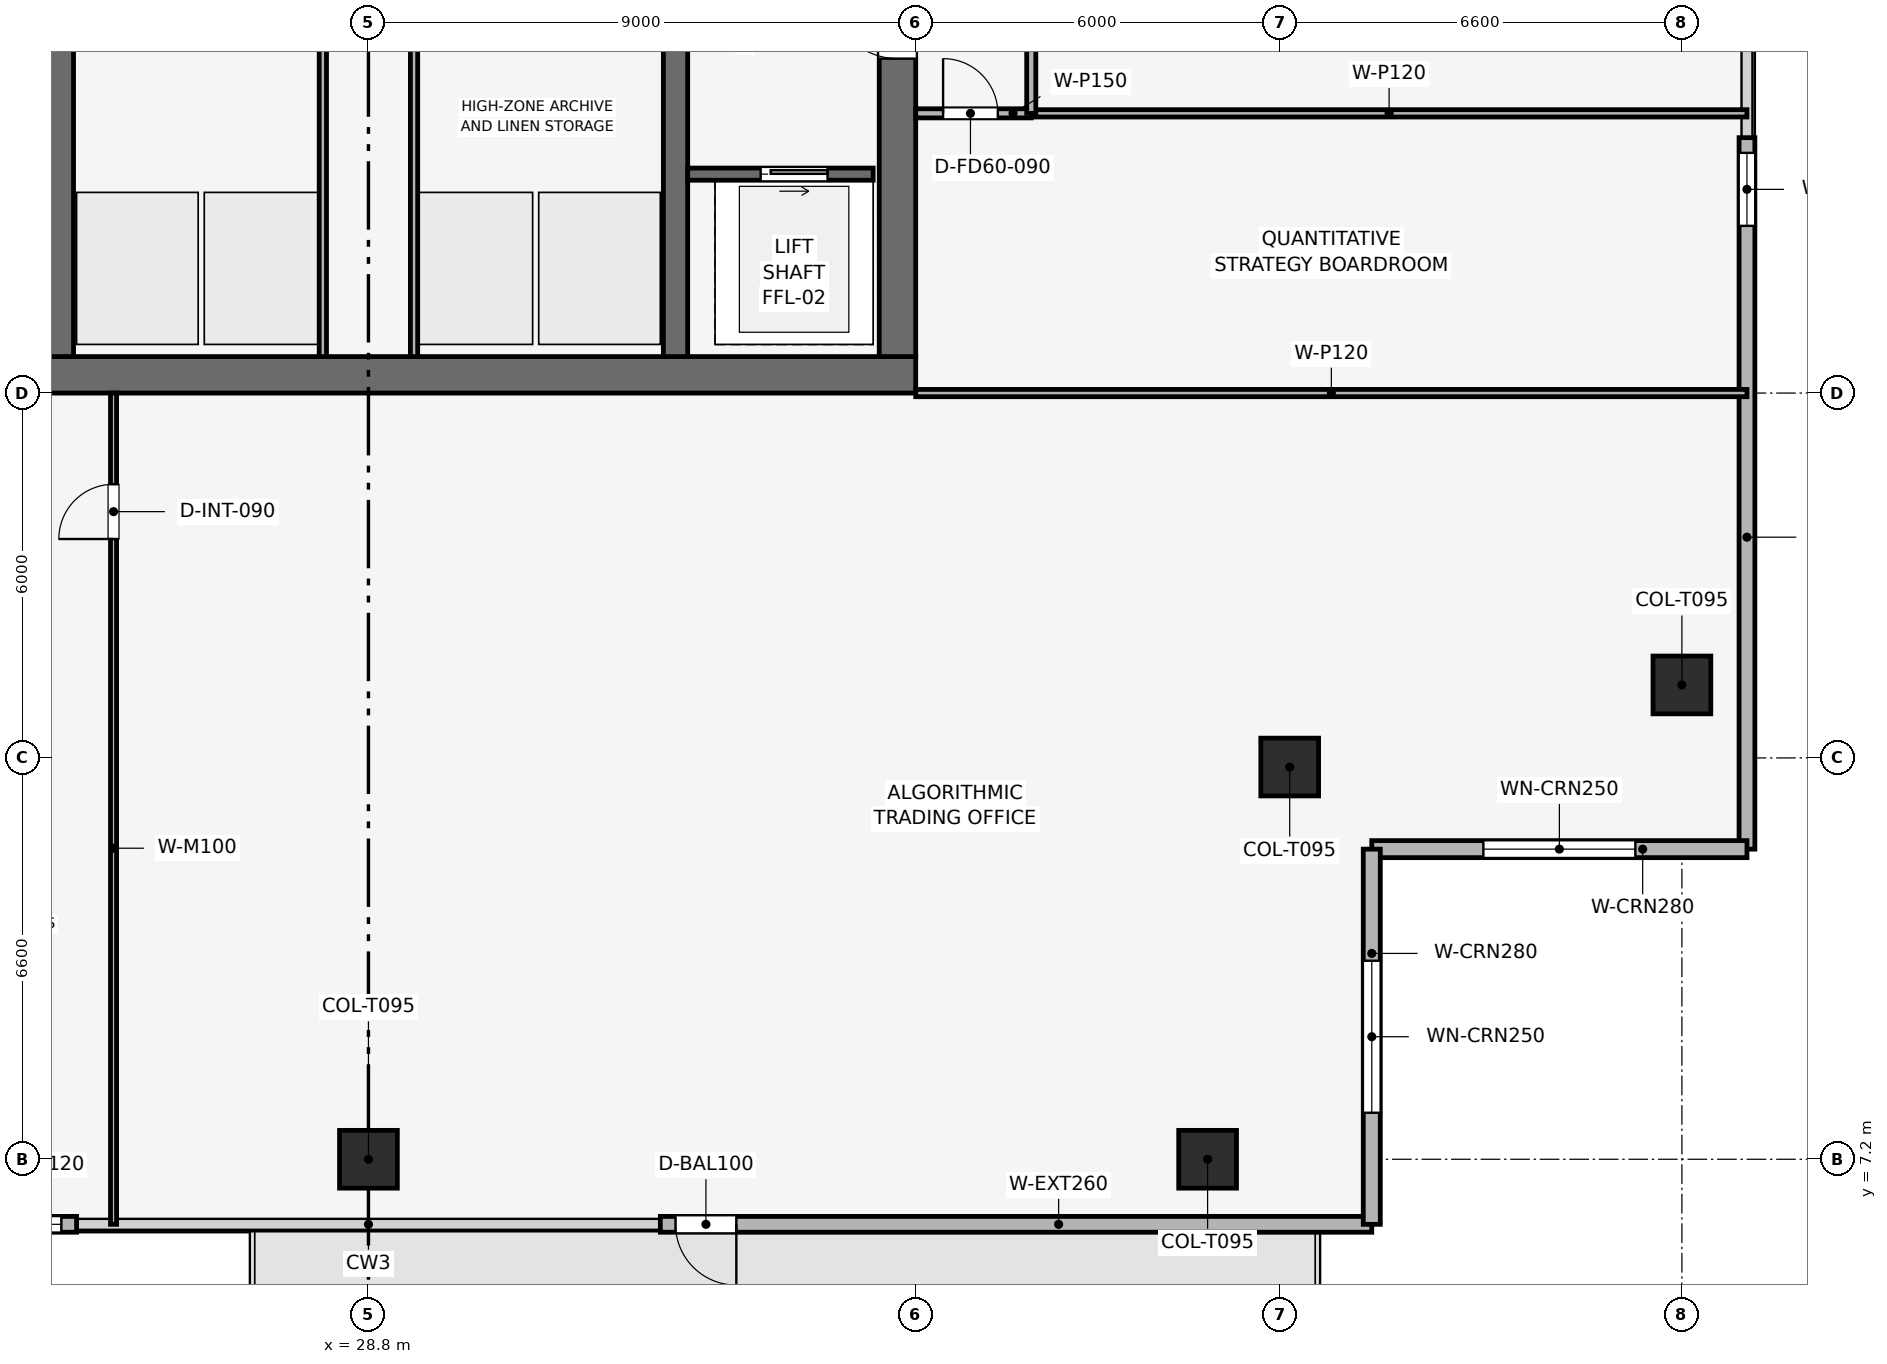
"""IFC4 building model, lengths in metres.
Left out: names, types, materials, properties, quantities, classifications, styles, units other than length and angle.
Written with IfcOpenShell. Run it as: python <this file> out.ifc"""

import sys

from ifc_helpers import new_model, si_unit, direction, frame, frame_2d, origin, origin_2d, place, context, subcontext, project, spatial, rectangle, extrude, element, fill, save


model = new_model("IFC4")
c1 = context("Model", 3, precision=1e-05, world=origin(), true_north=direction((0.0, 1.0)))
c2 = subcontext(c1, "Body", "Model", "MODEL_VIEW")
j1 = project(units=[si_unit("LENGTHUNIT", "METRE"), si_unit("PLANEANGLEUNIT", "RADIAN")], contexts=[c1])
p1 = place(None, origin())
s1 = spatial("IfcSite", under=j1, at=p1, CompositionType="ELEMENT")
p2 = place(p1, origin())
s2 = spatial("IfcBuilding", under=s1, at=p2, CompositionType="ELEMENT")
p3 = place(p2, frame((0.0, 0.0, 329.25)))
s3 = spatial("IfcBuildingStorey", under=s2, at=p3, CompositionType="ELEMENT", Elevation=329.25)
p4 = place(p3, frame((19.8, 20.1, 0.0), z_axis=(0.0, 0.0, 1.0), x_axis=(1.0, 0.0, 0.0)))
e1 = element("IfcWall", 1, at=p4, inside=s3, PredefinedType="SHEAR", context=c2, shape_type="SweptSolid", body=[
    extrude(rectangle(XDim=18.0, YDim=0.6, at=frame_2d((9.0, 0.0))), origin(), (0.0, 0.0, 1.0), 3.75),
])
p5 = place(p3, frame((37.5, 20.4, 0.0), z_axis=(0.0, 0.0, 1.0), x_axis=(0.0, 1.0, 0.0)))
e2 = element("IfcWall", 2, at=p5, inside=s3, PredefinedType="SHEAR", context=c2, shape_type="SweptSolid", body=[
    extrude(rectangle(XDim=16.8, YDim=0.6, at=frame_2d((8.4, 0.0))), origin(), (0.0, 0.0, 1.0), 3.75),
])
p6 = place(p5, frame((4.9, 0.0, 0.0)))
e3 = element("IfcOpeningElement", 3, at=p6, cuts=e2, PredefinedType="OPENING", context=c2, shape_type="SweptSolid", body=[
    extrude(rectangle(XDim=1.1, YDim=2.15, at=frame_2d((0.55, 1.075))), frame((0.0, 0.31, 0.0), z_axis=(0.0, -1.0, 0.0), x_axis=(1.0, 0.0, 0.0)), (0.0, 0.0, 1.0), 0.62),
])
for number, where, z_axis, x_axis in (
    (4, (23.75, 20.4, 0.0), (0.0, 0.0, 1.0), (0.0, 1.0, 0.0)),
    (5, (33.85, 20.4, 0.0), (0.0, 0.0, 1.0), (0.0, 1.0, 0.0)),
):
    element("IfcWall", number, at=place(p3, frame(where, z_axis=z_axis, x_axis=x_axis)), inside=s3, PredefinedType="SHEAR", context=c2, shape_type="SweptSolid", body=[
        extrude(rectangle(XDim=16.8, YDim=0.4, at=frame_2d((8.4, 0.0))), origin(), (0.0, 0.0, 1.0), 3.75),
    ])
for number, where, z_axis, x_axis in (
    (6, (28.8, 7.2, 0.003), (0.0, 0.158, 0.987), (-1.0, 0.0, 0.0)),
    (7, (42.6, 7.2, 0.003), (0.0, 0.158, 0.987), (-1.0, 0.0, 0.0)),
    (8, (50.4, 15.0, 0.003), (-0.158, 0.0, 0.987), (0.0, -1.0, 0.0)),
):
    element("IfcColumn", number, at=place(p3, frame(where, z_axis=z_axis, x_axis=x_axis)), inside=s3, PredefinedType="COLUMN", context=c2, shape_type="SweptSolid", body=[
        extrude(rectangle(XDim=0.95, YDim=0.95, at=origin_2d()), origin(), (0.0, 0.0, 1.0), 3.549),
    ])
p7 = place(p3, frame((43.95, 13.65, 0.003), z_axis=(-0.079681515195, 0.079681515195, 0.993630571325), x_axis=(-0.707106781187, -0.707106781187, 0.0)))
e9 = element("IfcColumn", 9, at=p7, inside=s3, PredefinedType="COLUMN", context=c2, shape_type="SweptSolid", body=[
    extrude(rectangle(XDim=0.95, YDim=0.95, at=origin_2d()), origin(), (0.0, 0.0, 1.0), 3.527),
])
p8 = place(p3, frame((45.3, 6.13, 0.0), z_axis=(0.0, 0.0, 1.0), x_axis=(-1.0, 0.0, 0.0)))
e10 = element("IfcWall", 10, at=p8, inside=s3, PredefinedType="SOLIDWALL", context=c2, shape_type="SweptSolid", body=[
    extrude(rectangle(XDim=11.7, YDim=0.26, at=frame_2d((5.85, 0.0))), origin(), (0.0, 0.0, 1.0), 3.51),
])
p9 = place(p8, frame((10.45, 0.0, 0.0)))
e11 = element("IfcOpeningElement", 11, at=p9, cuts=e10, PredefinedType="OPENING", context=c2, shape_type="SweptSolid", body=[
    extrude(rectangle(XDim=1.0, YDim=2.2, at=frame_2d((0.5, 1.1))), frame((0.0, 0.14, 0.0), z_axis=(0.0, -1.0, 0.0), x_axis=(1.0, 0.0, 0.0)), (0.0, 0.0, 1.0), 0.28),
])
p10 = place(p3, frame((24.0, 6.13, 0.0), z_axis=(0.0, 0.0, 1.0), x_axis=(-1.0, 0.0, 0.0)))
e12 = element("IfcWall", 12, at=p10, inside=s3, PredefinedType="SOLIDWALL", context=c2, shape_type="SweptSolid", body=[
    extrude(rectangle(XDim=11.7, YDim=0.26, at=frame_2d((5.85, 0.0))), origin(), (0.0, 0.0, 1.0), 3.51),
])
p11 = place(p10, frame((0.25, 0.0, 0.9)))
e13 = element("IfcOpeningElement", 13, at=p11, cuts=e12, PredefinedType="OPENING", context=c2, shape_type="SweptSolid", body=[
    extrude(rectangle(XDim=1.2, YDim=2.1, at=frame_2d((0.6, 1.05))), frame((0.0, 0.14, 0.0), z_axis=(0.0, -1.0, 0.0), x_axis=(1.0, 0.0, 0.0)), (0.0, 0.0, 1.0), 0.28),
])
p12 = place(p3, frame((51.47, 24.0, 0.0), z_axis=(0.0, 0.0, 1.0), x_axis=(0.0, -1.0, 0.0)))
e14 = element("IfcWall", 14, at=p12, inside=s3, PredefinedType="SOLIDWALL", context=c2, shape_type="SweptSolid", body=[
    extrude(rectangle(XDim=11.7, YDim=0.26, at=frame_2d((5.85, 0.0))), origin(), (0.0, 0.0, 1.0), 3.51),
])
p13 = place(p12, frame((0.25, 0.0, 0.9)))
e15 = element("IfcOpeningElement", 15, at=p13, cuts=e14, PredefinedType="OPENING", context=c2, shape_type="SweptSolid", body=[
    extrude(rectangle(XDim=1.2, YDim=2.1, at=frame_2d((0.6, 1.05))), frame((0.0, 0.14, 0.0), z_axis=(0.0, -1.0, 0.0), x_axis=(1.0, 0.0, 0.0)), (0.0, 0.0, 1.0), 0.28),
])
p14 = place(p3, frame((51.47, 12.3, 0.0), z_axis=(0.0, 0.0, 1.0), x_axis=(-1.0, 0.0, 0.0)))
e16 = element("IfcWall", 16, at=p14, inside=s3, PredefinedType="SOLIDWALL", context=c2, shape_type="SweptSolid", body=[
    extrude(rectangle(XDim=6.17, YDim=0.28, at=frame_2d((3.085, 0.0))), origin(), (0.0, 0.0, 1.0), 3.51),
])
p15 = place(p14, frame((1.835, 0.0, 0.9)))
e17 = element("IfcOpeningElement", 17, at=p15, cuts=e16, PredefinedType="OPENING", context=c2, shape_type="SweptSolid", body=[
    extrude(rectangle(XDim=2.5, YDim=1.9, at=frame_2d((1.25, 0.95))), frame((0.0, 0.15, 0.0), z_axis=(0.0, -1.0, 0.0), x_axis=(1.0, 0.0, 0.0)), (0.0, 0.0, 1.0), 0.3),
])
p16 = place(p3, frame((45.3, 12.3, 0.0), z_axis=(0.0, 0.0, 1.0), x_axis=(0.0, -1.0, 0.0)))
e18 = element("IfcWall", 18, at=p16, inside=s3, PredefinedType="SOLIDWALL", context=c2, shape_type="SweptSolid", body=[
    extrude(rectangle(XDim=6.17, YDim=0.28, at=frame_2d((3.085, 0.0))), origin(), (0.0, 0.0, 1.0), 3.51),
])
p17 = place(p16, frame((1.835, 0.0, 0.9)))
e19 = element("IfcOpeningElement", 19, at=p17, cuts=e18, PredefinedType="OPENING", context=c2, shape_type="SweptSolid", body=[
    extrude(rectangle(XDim=2.5, YDim=1.9, at=frame_2d((1.25, 0.95))), frame((0.0, 0.15, 0.0), z_axis=(0.0, -1.0, 0.0), x_axis=(1.0, 0.0, 0.0)), (0.0, 0.0, 1.0), 0.3),
])
p18 = place(p3, frame((34.05, 23.4, 0.0), z_axis=(0.0, 0.0, 1.0), x_axis=(1.0, 0.0, 0.0)))
e20 = element("IfcWall", 20, at=p18, inside=s3, PredefinedType="SHEAR", context=c2, shape_type="SweptSolid", body=[
    extrude(rectangle(XDim=3.05, YDim=0.2, at=frame_2d((1.525, 0.0))), origin(), (0.0, 0.0, 1.0), 3.51),
])
p19 = place(p18, frame((1.2, 0.0, 0.0)))
e21 = element("IfcOpeningElement", 21, at=p19, cuts=e20, PredefinedType="OPENING", context=c2, shape_type="SweptSolid", body=[
    extrude(rectangle(XDim=1.1, YDim=2.15, at=frame_2d((0.55, 1.075))), frame((0.0, 0.11, 0.0), z_axis=(0.0, -1.0, 0.0), x_axis=(1.0, 0.0, 0.0)), (0.0, 0.0, 1.0), 0.22),
])
for number, where, z_axis, x_axis in (
    (22, (28.05, 20.4, 0.0), (0.0, 0.0, 1.0), (0.0, 1.0, 0.0)),
    (23, (29.55, 20.4, 0.0), (0.0, 0.0, 1.0), (0.0, 1.0, 0.0)),
):
    element("IfcWall", number, at=place(p3, frame(where, z_axis=z_axis, x_axis=x_axis)), inside=s3, PredefinedType="PARTITIONING", context=c2, shape_type="SweptSolid", body=[
        extrude(rectangle(XDim=8.15, YDim=0.12, at=frame_2d((4.075, 0.0))), origin(), (0.0, 0.0, 1.0), 3.51),
    ])
p20 = place(p3, frame((24.608, 6.13, 0.0), z_axis=(0.0, 0.0, 1.0), x_axis=(0.0, 1.0, 0.0)))
e24 = element("IfcWall", 24, at=p20, inside=s3, PredefinedType="MOVABLE", context=c2, shape_type="SweptSolid", body=[
    extrude(rectangle(XDim=13.67, YDim=0.1, at=frame_2d((6.835, 0.0))), origin(), (0.0, 0.0, 1.0), 3.135),
])
p21 = place(p20, frame((11.27, 0.0, 0.0)))
e25 = element("IfcOpeningElement", 25, at=p21, cuts=e24, PredefinedType="OPENING", context=c2, shape_type="SweptSolid", body=[
    extrude(rectangle(XDim=0.9, YDim=2.1, at=frame_2d((0.45, 1.05))), frame((0.0, 0.06, 0.0), z_axis=(0.0, -1.0, 0.0), x_axis=(1.0, 0.0, 0.0)), (0.0, 0.0, 1.0), 0.12),
])
p22 = place(p3, frame((37.8, 19.8, 0.0), z_axis=(0.0, 0.0, 1.0), x_axis=(1.0, 0.0, 0.0)))
e26 = element("IfcWall", 26, at=p22, inside=s3, PredefinedType="PARTITIONING", context=c2, shape_type="SweptSolid", body=[
    extrude(rectangle(XDim=13.67, YDim=0.12, at=frame_2d((6.835, 0.0))), origin(), (0.0, 0.0, 1.0), 3.095),
])
p23 = place(p3, frame((37.8, 24.4, 0.0), z_axis=(0.0, 0.0, 1.0), x_axis=(1.0, 0.0, 0.0)))
e27 = element("IfcWall", 27, at=p23, inside=s3, PredefinedType="PARTITIONING", context=c2, shape_type="SweptSolid", body=[
    extrude(rectangle(XDim=1.9, YDim=0.15, at=frame_2d((0.95, 0.0))), origin(), (0.0, 0.0, 1.0), 3.51),
])
p24 = place(p23, frame((0.45, 0.0, 0.0)))
e28 = element("IfcOpeningElement", 28, at=p24, cuts=e27, PredefinedType="OPENING", context=c2, shape_type="SweptSolid", body=[
    extrude(rectangle(XDim=0.9, YDim=2.1, at=frame_2d((0.45, 1.05))), frame((0.0, 0.085, 0.0), z_axis=(0.0, -1.0, 0.0), x_axis=(1.0, 0.0, 0.0)), (0.0, 0.0, 1.0), 0.17),
])
p25 = place(p3, frame((39.7, 24.4, 0.0), z_axis=(0.0, 0.0, 1.0), x_axis=(1.0, 0.0, 0.0)))
e29 = element("IfcWall", 29, at=p25, inside=s3, PredefinedType="PARTITIONING", context=c2, shape_type="SweptSolid", body=[
    extrude(rectangle(XDim=11.77, YDim=0.12, at=frame_2d((5.885, 0.0))), origin(), (0.0, 0.0, 1.0), 3.135),
])
p26 = place(p3, frame((39.7, 24.4, 0.0), z_axis=(0.0, 0.0, 1.0), x_axis=(0.0, 1.0, 0.0)))
e30 = element("IfcWall", 30, at=p26, inside=s3, PredefinedType="PARTITIONING", context=c2, shape_type="SweptSolid", body=[
    extrude(rectangle(XDim=15.3, YDim=0.15, at=frame_2d((7.65, 0.0))), origin(), (0.0, 0.0, 1.0), 3.095),
])
p27 = place(p26, frame((7.2, 0.0, 0.0)))
e31 = element("IfcOpeningElement", 31, at=p27, cuts=e30, PredefinedType="OPENING", context=c2, shape_type="SweptSolid", body=[
    extrude(rectangle(XDim=0.9, YDim=2.1, at=frame_2d((0.45, 1.05))), frame((0.0, 0.085, 0.0), z_axis=(0.0, -1.0, 0.0), x_axis=(1.0, 0.0, 0.0)), (0.0, 0.0, 1.0), 0.17),
])
p28 = place(p9, origin())
e32 = element("IfcDoor", 32, at=p28, inside=s3, OperationType="SINGLE_SWING_LEFT", PredefinedType="DOOR", context=c2, shape_type="SweptSolid", body=[
    extrude(rectangle(XDim=1.0, YDim=2.2, at=frame_2d((0.5, 1.1))), frame((0.0, 0.025, 0.0), z_axis=(0.0, -1.0, 0.0), x_axis=(1.0, 0.0, 0.0)), (0.0, 0.0, 1.0), 0.05),
])
fill(e11, e32)
p29 = place(p11, origin())
e33 = element("IfcWindow", 33, at=p29, inside=s3, PartitioningType="SINGLE_PANEL", PredefinedType="WINDOW", context=c2, shape_type="SweptSolid", body=[
    extrude(rectangle(XDim=1.2, YDim=2.1, at=frame_2d((0.6, 1.05))), frame((0.0, 0.03, 0.0), z_axis=(0.0, -1.0, 0.0), x_axis=(1.0, 0.0, 0.0)), (0.0, 0.0, 1.0), 0.06),
])
fill(e13, e33)
p30 = place(p13, origin())
e34 = element("IfcWindow", 34, at=p30, inside=s3, PartitioningType="SINGLE_PANEL", PredefinedType="WINDOW", context=c2, shape_type="SweptSolid", body=[
    extrude(rectangle(XDim=1.2, YDim=2.1, at=frame_2d((0.6, 1.05))), frame((0.0, 0.03, 0.0), z_axis=(0.0, -1.0, 0.0), x_axis=(1.0, 0.0, 0.0)), (0.0, 0.0, 1.0), 0.06),
])
fill(e15, e34)
p31 = place(p15, origin())
e35 = element("IfcWindow", 35, at=p31, inside=s3, PartitioningType="SINGLE_PANEL", PredefinedType="WINDOW", context=c2, shape_type="SweptSolid", body=[
    extrude(rectangle(XDim=2.5, YDim=1.9, at=frame_2d((1.25, 0.95))), frame((0.0, 0.03, 0.0), z_axis=(0.0, -1.0, 0.0), x_axis=(1.0, 0.0, 0.0)), (0.0, 0.0, 1.0), 0.06),
])
fill(e17, e35)
p32 = place(p17, origin())
e36 = element("IfcWindow", 36, at=p32, inside=s3, PartitioningType="SINGLE_PANEL", PredefinedType="WINDOW", context=c2, shape_type="SweptSolid", body=[
    extrude(rectangle(XDim=2.5, YDim=1.9, at=frame_2d((1.25, 0.95))), frame((0.0, 0.03, 0.0), z_axis=(0.0, -1.0, 0.0), x_axis=(1.0, 0.0, 0.0)), (0.0, 0.0, 1.0), 0.06),
])
fill(e19, e36)
p33 = place(p19, origin())
e37 = element("IfcDoor", 37, at=p33, inside=s3, OperationType="SLIDING_TO_RIGHT", PredefinedType="DOOR", context=c2, shape_type="SweptSolid", body=[
    extrude(rectangle(XDim=1.1, YDim=2.15, at=frame_2d((0.55, 1.075))), frame((0.0, 0.025, 0.0), z_axis=(0.0, -1.0, 0.0), x_axis=(1.0, 0.0, 0.0)), (0.0, 0.0, 1.0), 0.05),
])
fill(e21, e37)
p34 = place(p21, origin())
e38 = element("IfcDoor", 38, at=p34, inside=s3, OperationType="SINGLE_SWING_LEFT", PredefinedType="DOOR", context=c2, shape_type="SweptSolid", body=[
    extrude(rectangle(XDim=0.9, YDim=2.1, at=frame_2d((0.45, 1.05))), frame((0.0, 0.025, 0.0), z_axis=(0.0, -1.0, 0.0), x_axis=(1.0, 0.0, 0.0)), (0.0, 0.0, 1.0), 0.05),
])
fill(e25, e38)
p35 = place(p24, origin())
e39 = element("IfcDoor", 39, at=p35, inside=s3, OperationType="SINGLE_SWING_LEFT", PredefinedType="DOOR", context=c2, shape_type="SweptSolid", body=[
    extrude(rectangle(XDim=0.9, YDim=2.1, at=frame_2d((0.45, 1.05))), frame((0.0, 0.025, 0.0), z_axis=(0.0, -1.0, 0.0), x_axis=(1.0, 0.0, 0.0)), (0.0, 0.0, 1.0), 0.05),
])
fill(e28, e39)
p36 = place(p6, origin())
e40 = element("IfcDoor", 40, at=p36, inside=s3, OperationType="SINGLE_SWING_RIGHT", PredefinedType="DOOR", context=c2, shape_type="SweptSolid", body=[
    extrude(rectangle(XDim=1.1, YDim=2.15, at=frame_2d((0.55, 1.075))), frame((0.0, 0.025, 0.0), z_axis=(0.0, -1.0, 0.0), x_axis=(1.0, 0.0, 0.0)), (0.0, 0.0, 1.0), 0.05),
])
fill(e3, e40)
save(model, sys.argv[1])
